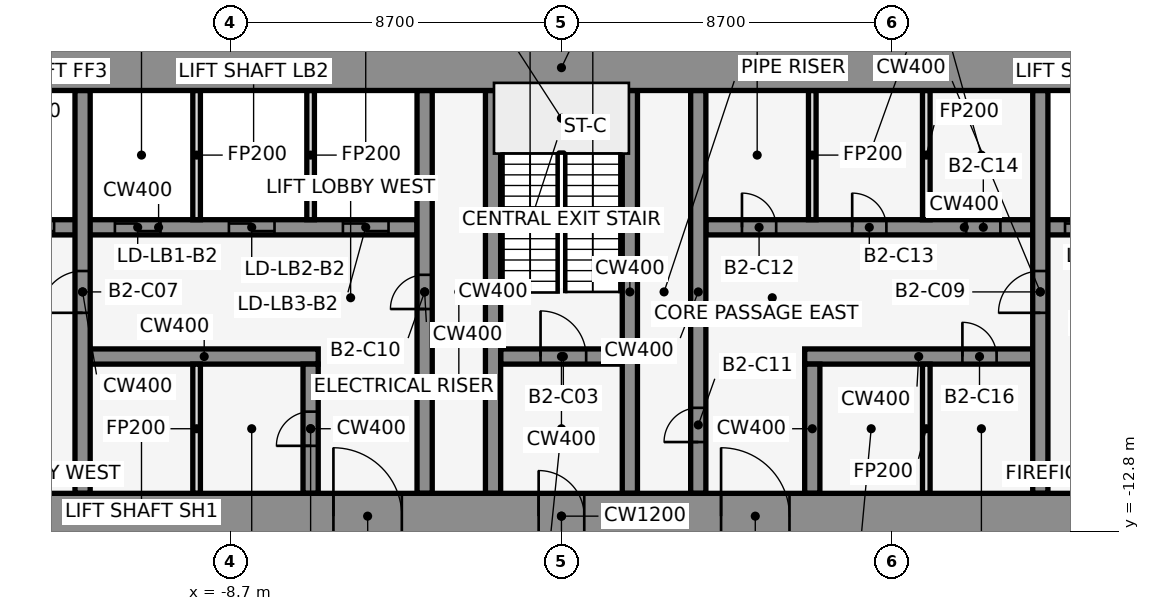
"""IFC4 building model, lengths in metres.
Left out: names, types, materials, properties, quantities, classifications, styles, units other than length and angle.
Written with IfcOpenShell. Run it as: python <this file> out.ifc"""

import sys

from ifc_helpers import new_model, si_unit, direction, frame, frame_2d, origin, place, context, subcontext, project, spatial, rectangle, extrude, element, fill, save


model = new_model("IFC4")
c1 = context("Model", 3, precision=1e-05, world=origin(), true_north=direction((0.0, 1.0)))
c2 = subcontext(c1, "Body", "Model", "MODEL_VIEW")
j1 = project(units=[si_unit("LENGTHUNIT", "METRE"), si_unit("PLANEANGLEUNIT", "RADIAN")], contexts=[c1])
p1 = place(None, origin())
s1 = spatial("IfcSite", under=j1, at=p1, CompositionType="ELEMENT")
p2 = place(p1, origin())
s2 = spatial("IfcBuilding", under=s1, at=p2, CompositionType="ELEMENT")
p3 = place(p2, frame((0.0, 0.0, -10.0)))
s3 = spatial("IfcBuildingStorey", under=s2, at=p3, CompositionType="ELEMENT", Elevation=-10.0)
p4 = place(p3, frame((-12.4, -8.2, 0.0), z_axis=(0.0, 0.0, 1.0), x_axis=(1.0, 0.0, 0.0)))
e1 = element("IfcWall", 1, at=p4, inside=s3, PredefinedType="SHEAR", context=c2, shape_type="SweptSolid", body=[
    extrude(rectangle(XDim=6.0, YDim=0.4, at=frame_2d((3.0, 0.0))), origin(), (0.0, 0.0, 1.0), 5.0),
])
p5 = place(p3, frame((-1.6, -8.2, 0.0), z_axis=(0.0, 0.0, 1.0), x_axis=(1.0, 0.0, 0.0)))
e2 = element("IfcWall", 2, at=p5, inside=s3, PredefinedType="SHEAR", context=c2, shape_type="SweptSolid", body=[
    extrude(rectangle(XDim=3.2, YDim=0.4, at=frame_2d((1.6, 0.0))), origin(), (0.0, 0.0, 1.0), 5.0),
])
p6 = place(p5, frame((1.05, 0.0, 0.0)))
e3 = element("IfcOpeningElement", 3, at=p6, cuts=e2, PredefinedType="OPENING", context=c2, shape_type="SweptSolid", body=[
    extrude(rectangle(XDim=1.2, YDim=2.1, at=frame_2d((0.6, 1.05))), frame((0.0, 0.212, 0.0), z_axis=(0.0, -1.0, 0.0), x_axis=(1.0, 0.0, 0.0)), (0.0, 0.0, 1.0), 0.424),
])
p7 = place(p3, frame((6.4, -8.2, 0.0), z_axis=(0.0, 0.0, 1.0), x_axis=(1.0, 0.0, 0.0)))
e4 = element("IfcWall", 4, at=p7, inside=s3, PredefinedType="SHEAR", context=c2, shape_type="SweptSolid", body=[
    extrude(rectangle(XDim=6.0, YDim=0.4, at=frame_2d((3.0, 0.0))), origin(), (0.0, 0.0, 1.0), 5.0),
])
p8 = place(p7, frame((4.15, 0.0, 0.0)))
e5 = element("IfcOpeningElement", 5, at=p8, cuts=e4, PredefinedType="OPENING", context=c2, shape_type="SweptSolid", body=[
    extrude(rectangle(XDim=0.9, YDim=2.1, at=frame_2d((0.45, 1.05))), frame((0.0, 0.212, 0.0), z_axis=(0.0, -1.0, 0.0), x_axis=(1.0, 0.0, 0.0)), (0.0, 0.0, 1.0), 0.424),
])
p9 = place(p3, frame((-17.4, -4.8, 0.0), z_axis=(0.0, 0.0, 1.0), x_axis=(1.0, 0.0, 0.0)))
e6 = element("IfcWall", 6, at=p9, inside=s3, PredefinedType="SHEAR", context=c2, shape_type="SweptSolid", body=[
    extrude(rectangle(XDim=13.6, YDim=0.4, at=frame_2d((6.8, 0.0))), origin(), (0.0, 0.0, 1.0), 5.0),
])
p10 = place(p9, frame((0.65, 0.0, 0.0)))
e7 = element("IfcOpeningElement", 7, at=p10, cuts=e6, PredefinedType="OPENING", context=c2, shape_type="SweptSolid", body=[
    extrude(rectangle(XDim=1.1, YDim=2.1, at=frame_2d((0.55, 1.05))), frame((0.0, 0.212, 0.0), z_axis=(0.0, -1.0, 0.0), x_axis=(1.0, 0.0, 0.0)), (0.0, 0.0, 1.0), 0.424),
])
p11 = place(p9, frame((2.95, 0.0, 0.0)))
e8 = element("IfcOpeningElement", 8, at=p11, cuts=e6, PredefinedType="OPENING", context=c2, shape_type="SweptSolid", body=[
    extrude(rectangle(XDim=1.1, YDim=2.1, at=frame_2d((0.55, 1.05))), frame((0.0, 0.212, 0.0), z_axis=(0.0, -1.0, 0.0), x_axis=(1.0, 0.0, 0.0)), (0.0, 0.0, 1.0), 0.424),
])
p12 = place(p9, frame((5.65, 0.0, 0.0)))
e9 = element("IfcOpeningElement", 9, at=p12, cuts=e6, PredefinedType="OPENING", context=c2, shape_type="SweptSolid", body=[
    extrude(rectangle(XDim=1.2, YDim=2.1, at=frame_2d((0.6, 1.05))), frame((0.0, 0.212, 0.0), z_axis=(0.0, -1.0, 0.0), x_axis=(1.0, 0.0, 0.0)), (0.0, 0.0, 1.0), 0.424),
])
p13 = place(p9, frame((8.65, 0.0, 0.0)))
e10 = element("IfcOpeningElement", 10, at=p13, cuts=e6, PredefinedType="OPENING", context=c2, shape_type="SweptSolid", body=[
    extrude(rectangle(XDim=1.2, YDim=2.1, at=frame_2d((0.6, 1.05))), frame((0.0, 0.212, 0.0), z_axis=(0.0, -1.0, 0.0), x_axis=(1.0, 0.0, 0.0)), (0.0, 0.0, 1.0), 0.424),
])
p14 = place(p9, frame((11.65, 0.0, 0.0)))
e11 = element("IfcOpeningElement", 11, at=p14, cuts=e6, PredefinedType="OPENING", context=c2, shape_type="SweptSolid", body=[
    extrude(rectangle(XDim=1.2, YDim=2.1, at=frame_2d((0.6, 1.05))), frame((0.0, 0.212, 0.0), z_axis=(0.0, -1.0, 0.0), x_axis=(1.0, 0.0, 0.0)), (0.0, 0.0, 1.0), 0.424),
])
p15 = place(p3, frame((3.8, -4.8, 0.0), z_axis=(0.0, 0.0, 1.0), x_axis=(1.0, 0.0, 0.0)))
e12 = element("IfcWall", 12, at=p15, inside=s3, PredefinedType="SHEAR", context=c2, shape_type="SweptSolid", body=[
    extrude(rectangle(XDim=13.6, YDim=0.4, at=frame_2d((6.8, 0.0))), origin(), (0.0, 0.0, 1.0), 5.0),
])
p16 = place(p15, frame((9.45, 0.0, 0.0)))
e13 = element("IfcOpeningElement", 13, at=p16, cuts=e12, PredefinedType="OPENING", context=c2, shape_type="SweptSolid", body=[
    extrude(rectangle(XDim=1.1, YDim=2.1, at=frame_2d((0.55, 1.05))), frame((0.0, 0.212, 0.0), z_axis=(0.0, -1.0, 0.0), x_axis=(1.0, 0.0, 0.0)), (0.0, 0.0, 1.0), 0.424),
])
p17 = place(p15, frame((11.85, 0.0, 0.0)))
e14 = element("IfcOpeningElement", 14, at=p17, cuts=e12, PredefinedType="OPENING", context=c2, shape_type="SweptSolid", body=[
    extrude(rectangle(XDim=1.1, YDim=2.1, at=frame_2d((0.55, 1.05))), frame((0.0, 0.212, 0.0), z_axis=(0.0, -1.0, 0.0), x_axis=(1.0, 0.0, 0.0)), (0.0, 0.0, 1.0), 0.424),
])
p18 = place(p15, frame((0.95, 0.0, 0.0)))
e15 = element("IfcOpeningElement", 15, at=p18, cuts=e12, PredefinedType="OPENING", context=c2, shape_type="SweptSolid", body=[
    extrude(rectangle(XDim=0.9, YDim=2.1, at=frame_2d((0.45, 1.05))), frame((0.0, 0.212, 0.0), z_axis=(0.0, -1.0, 0.0), x_axis=(1.0, 0.0, 0.0)), (0.0, 0.0, 1.0), 0.424),
])
p19 = place(p15, frame((3.85, 0.0, 0.0)))
e16 = element("IfcOpeningElement", 16, at=p19, cuts=e12, PredefinedType="OPENING", context=c2, shape_type="SweptSolid", body=[
    extrude(rectangle(XDim=0.9, YDim=2.1, at=frame_2d((0.45, 1.05))), frame((0.0, 0.212, 0.0), z_axis=(0.0, -1.0, 0.0), x_axis=(1.0, 0.0, 0.0)), (0.0, 0.0, 1.0), 0.424),
])
p20 = place(p15, frame((6.85, 0.0, 0.0)))
e17 = element("IfcOpeningElement", 17, at=p20, cuts=e12, PredefinedType="OPENING", context=c2, shape_type="SweptSolid", body=[
    extrude(rectangle(XDim=0.9, YDim=2.1, at=frame_2d((0.45, 1.05))), frame((0.0, 0.212, 0.0), z_axis=(0.0, -1.0, 0.0), x_axis=(1.0, 0.0, 0.0)), (0.0, 0.0, 1.0), 0.424),
])
p21 = place(p3, frame((-12.6, -11.8, 0.0), z_axis=(0.0, 0.0, 1.0), x_axis=(0.0, 1.0, 0.0)))
e18 = element("IfcWall", 18, at=p21, inside=s3, PredefinedType="SHEAR", context=c2, shape_type="SweptSolid", body=[
    extrude(rectangle(XDim=10.6, YDim=0.4, at=frame_2d((5.3, 0.0))), origin(), (0.0, 0.0, 1.0), 5.0),
])
p22 = place(p21, frame((4.75, 0.0, 0.0)))
e19 = element("IfcOpeningElement", 19, at=p22, cuts=e18, PredefinedType="OPENING", context=c2, shape_type="SweptSolid", body=[
    extrude(rectangle(XDim=1.1, YDim=2.1, at=frame_2d((0.55, 1.05))), frame((0.0, 0.212, 0.0), z_axis=(0.0, -1.0, 0.0), x_axis=(1.0, 0.0, 0.0)), (0.0, 0.0, 1.0), 0.424),
])
for number, where, z_axis, x_axis in (
    (20, (-9.6, -11.8, 0.0), (0.0, 0.0, 1.0), (0.0, 1.0, 0.0)),
    (21, (-9.6, -4.6, 0.0), (0.0, 0.0, 1.0), (0.0, 1.0, 0.0)),
):
    element("IfcWall", number, at=place(p3, frame(where, z_axis=z_axis, x_axis=x_axis)), inside=s3, PredefinedType="PARTITIONING", context=c2, shape_type="SweptSolid", body=[
        extrude(rectangle(XDim=3.4, YDim=0.2, at=frame_2d((1.7, 0.0))), origin(), (0.0, 0.0, 1.0), 4.7),
    ])
p23 = place(p3, frame((-6.6, -11.8, 0.0), z_axis=(0.0, 0.0, 1.0), x_axis=(0.0, 1.0, 0.0)))
e22 = element("IfcWall", 22, at=p23, inside=s3, PredefinedType="SHEAR", context=c2, shape_type="SweptSolid", body=[
    extrude(rectangle(XDim=3.4, YDim=0.4, at=frame_2d((1.7, 0.0))), origin(), (0.0, 0.0, 1.0), 5.0),
])
p24 = place(p23, frame((1.25, 0.0, 0.0)))
e23 = element("IfcOpeningElement", 23, at=p24, cuts=e22, PredefinedType="OPENING", context=c2, shape_type="SweptSolid", body=[
    extrude(rectangle(XDim=0.9, YDim=2.1, at=frame_2d((0.45, 1.05))), frame((0.0, 0.212, 0.0), z_axis=(0.0, -1.0, 0.0), x_axis=(1.0, 0.0, 0.0)), (0.0, 0.0, 1.0), 0.424),
])
p25 = place(p3, frame((-6.6, -4.6, 0.0), z_axis=(0.0, 0.0, 1.0), x_axis=(0.0, 1.0, 0.0)))
e24 = element("IfcWall", 24, at=p25, inside=s3, PredefinedType="PARTITIONING", context=c2, shape_type="SweptSolid", body=[
    extrude(rectangle(XDim=3.4, YDim=0.2, at=frame_2d((1.7, 0.0))), origin(), (0.0, 0.0, 1.0), 4.7),
])
p26 = place(p3, frame((-3.6, -11.8, 0.0), z_axis=(0.0, 0.0, 1.0), x_axis=(0.0, 1.0, 0.0)))
e25 = element("IfcWall", 25, at=p26, inside=s3, PredefinedType="SHEAR", context=c2, shape_type="SweptSolid", body=[
    extrude(rectangle(XDim=10.6, YDim=0.4, at=frame_2d((5.3, 0.0))), origin(), (0.0, 0.0, 1.0), 5.0),
])
p27 = place(p26, frame((4.85, 0.0, 0.0)))
e26 = element("IfcOpeningElement", 26, at=p27, cuts=e25, PredefinedType="OPENING", context=c2, shape_type="SweptSolid", body=[
    extrude(rectangle(XDim=0.9, YDim=2.1, at=frame_2d((0.45, 1.05))), frame((0.0, 0.212, 0.0), z_axis=(0.0, -1.0, 0.0), x_axis=(1.0, 0.0, 0.0)), (0.0, 0.0, 1.0), 0.424),
])
for number, where, z_axis, x_axis in (
    (27, (-1.8, -11.8, 0.0), (0.0, 0.0, 1.0), (0.0, 1.0, 0.0)),
    (28, (1.8, -11.8, 0.0), (0.0, 0.0, 1.0), (0.0, 1.0, 0.0)),
):
    element("IfcWall", number, at=place(p3, frame(where, z_axis=z_axis, x_axis=x_axis)), inside=s3, PredefinedType="SHEAR", context=c2, shape_type="SweptSolid", body=[
        extrude(rectangle(XDim=10.6, YDim=0.4, at=frame_2d((5.3, 0.0))), origin(), (0.0, 0.0, 1.0), 5.0),
    ])
p28 = place(p3, frame((3.6, -11.8, 0.0), z_axis=(0.0, 0.0, 1.0), x_axis=(0.0, 1.0, 0.0)))
e29 = element("IfcWall", 29, at=p28, inside=s3, PredefinedType="SHEAR", context=c2, shape_type="SweptSolid", body=[
    extrude(rectangle(XDim=10.6, YDim=0.4, at=frame_2d((5.3, 0.0))), origin(), (0.0, 0.0, 1.0), 5.0),
])
p29 = place(p28, frame((1.35, 0.0, 0.0)))
e30 = element("IfcOpeningElement", 30, at=p29, cuts=e29, PredefinedType="OPENING", context=c2, shape_type="SweptSolid", body=[
    extrude(rectangle(XDim=0.9, YDim=2.1, at=frame_2d((0.45, 1.05))), frame((0.0, 0.212, 0.0), z_axis=(0.0, -1.0, 0.0), x_axis=(1.0, 0.0, 0.0)), (0.0, 0.0, 1.0), 0.424),
])
p30 = place(p3, frame((6.6, -11.8, 0.0), z_axis=(0.0, 0.0, 1.0), x_axis=(0.0, 1.0, 0.0)))
e31 = element("IfcWall", 31, at=p30, inside=s3, PredefinedType="SHEAR", context=c2, shape_type="SweptSolid", body=[
    extrude(rectangle(XDim=3.4, YDim=0.4, at=frame_2d((1.7, 0.0))), origin(), (0.0, 0.0, 1.0), 5.0),
])
for number, where, z_axis, x_axis in (
    (32, (6.6, -4.6, 0.0), (0.0, 0.0, 1.0), (0.0, 1.0, 0.0)),
    (33, (9.6, -11.8, 0.0), (0.0, 0.0, 1.0), (0.0, 1.0, 0.0)),
    (34, (9.6, -4.6, 0.0), (0.0, 0.0, 1.0), (0.0, 1.0, 0.0)),
):
    element("IfcWall", number, at=place(p3, frame(where, z_axis=z_axis, x_axis=x_axis)), inside=s3, PredefinedType="PARTITIONING", context=c2, shape_type="SweptSolid", body=[
        extrude(rectangle(XDim=3.4, YDim=0.2, at=frame_2d((1.7, 0.0))), origin(), (0.0, 0.0, 1.0), 4.7),
    ])
p31 = place(p3, frame((12.6, -11.8, 0.0), z_axis=(0.0, 0.0, 1.0), x_axis=(0.0, 1.0, 0.0)))
e35 = element("IfcWall", 35, at=p31, inside=s3, PredefinedType="SHEAR", context=c2, shape_type="SweptSolid", body=[
    extrude(rectangle(XDim=10.6, YDim=0.4, at=frame_2d((5.3, 0.0))), origin(), (0.0, 0.0, 1.0), 5.0),
])
p32 = place(p31, frame((4.75, 0.0, 0.0)))
e36 = element("IfcOpeningElement", 36, at=p32, cuts=e35, PredefinedType="OPENING", context=c2, shape_type="SweptSolid", body=[
    extrude(rectangle(XDim=1.1, YDim=2.1, at=frame_2d((0.55, 1.05))), frame((0.0, 0.212, 0.0), z_axis=(0.0, -1.0, 0.0), x_axis=(1.0, 0.0, 0.0)), (0.0, 0.0, 1.0), 0.424),
])
p33 = place(p3, frame((-22.0, -0.6, 0.0), z_axis=(0.0, 0.0, 1.0), x_axis=(1.0, 0.0, 0.0)))
e37 = element("IfcWall", 37, at=p33, inside=s3, PredefinedType="SHEAR", context=c2, shape_type="SweptSolid", body=[
    extrude(rectangle(XDim=44.0, YDim=1.2, at=frame_2d((22.0, 0.0))), origin(), (0.0, 0.0, 1.0), 5.0),
])
p34 = place(p3, frame((-22.0, -12.4, 0.0), z_axis=(0.0, 0.0, 1.0), x_axis=(1.0, 0.0, 0.0)))
e38 = element("IfcWall", 38, at=p34, inside=s3, PredefinedType="SHEAR", context=c2, shape_type="SweptSolid", body=[
    extrude(rectangle(XDim=44.0, YDim=1.2, at=frame_2d((22.0, 0.0))), origin(), (0.0, 0.0, 1.0), 5.0),
])
p35 = place(p34, frame((2.2, 0.0, 0.0)))
e39 = element("IfcOpeningElement", 39, at=p35, cuts=e38, PredefinedType="OPENING", context=c2, shape_type="SweptSolid", body=[
    extrude(rectangle(XDim=1.2, YDim=2.1, at=frame_2d((0.6, 1.05))), frame((0.0, 0.612, 0.0), z_axis=(0.0, -1.0, 0.0), x_axis=(1.0, 0.0, 0.0)), (0.0, 0.0, 1.0), 1.224),
])
p36 = place(p34, frame((21.4, 0.0, 0.0)))
e40 = element("IfcOpeningElement", 40, at=p36, cuts=e38, PredefinedType="OPENING", context=c2, shape_type="SweptSolid", body=[
    extrude(rectangle(XDim=1.2, YDim=2.1, at=frame_2d((0.6, 1.05))), frame((0.0, 0.612, 0.0), z_axis=(0.0, -1.0, 0.0), x_axis=(1.0, 0.0, 0.0)), (0.0, 0.0, 1.0), 1.224),
])
p37 = place(p34, frame((40.6, 0.0, 0.0)))
e41 = element("IfcOpeningElement", 41, at=p37, cuts=e38, PredefinedType="OPENING", context=c2, shape_type="SweptSolid", body=[
    extrude(rectangle(XDim=1.2, YDim=2.1, at=frame_2d((0.6, 1.05))), frame((0.0, 0.612, 0.0), z_axis=(0.0, -1.0, 0.0), x_axis=(1.0, 0.0, 0.0)), (0.0, 0.0, 1.0), 1.224),
])
p38 = place(p34, frame((16.0, 0.0, 0.0)))
e42 = element("IfcOpeningElement", 42, at=p38, cuts=e38, PredefinedType="OPENING", context=c2, shape_type="SweptSolid", body=[
    extrude(rectangle(XDim=1.8, YDim=2.1, at=frame_2d((0.9, 1.05))), frame((0.0, 0.612, 0.0), z_axis=(0.0, -1.0, 0.0), x_axis=(1.0, 0.0, 0.0)), (0.0, 0.0, 1.0), 1.224),
])
p39 = place(p34, frame((6.3, 0.0, 0.0)))
e43 = element("IfcOpeningElement", 43, at=p39, cuts=e38, PredefinedType="OPENING", context=c2, shape_type="SweptSolid", body=[
    extrude(rectangle(XDim=1.2, YDim=2.1, at=frame_2d((0.6, 1.05))), frame((0.0, 0.612, 0.0), z_axis=(0.0, -1.0, 0.0), x_axis=(1.0, 0.0, 0.0)), (0.0, 0.0, 1.0), 1.224),
])
p40 = place(p34, frame((26.2, 0.0, 0.0)))
e44 = element("IfcOpeningElement", 44, at=p40, cuts=e38, PredefinedType="OPENING", context=c2, shape_type="SweptSolid", body=[
    extrude(rectangle(XDim=1.8, YDim=2.1, at=frame_2d((0.9, 1.05))), frame((0.0, 0.612, 0.0), z_axis=(0.0, -1.0, 0.0), x_axis=(1.0, 0.0, 0.0)), (0.0, 0.0, 1.0), 1.224),
])
p41 = place(p34, frame((36.5, 0.0, 0.0)))
e45 = element("IfcOpeningElement", 45, at=p41, cuts=e38, PredefinedType="OPENING", context=c2, shape_type="SweptSolid", body=[
    extrude(rectangle(XDim=1.2, YDim=2.1, at=frame_2d((0.6, 1.05))), frame((0.0, 0.612, 0.0), z_axis=(0.0, -1.0, 0.0), x_axis=(1.0, 0.0, 0.0)), (0.0, 0.0, 1.0), 1.224),
])
p42 = place(p6, origin())
e46 = element("IfcDoor", 46, at=p42, inside=s3, OperationType="SINGLE_SWING_LEFT", PredefinedType="DOOR", context=c2, shape_type="SweptSolid", body=[
    extrude(rectangle(XDim=1.2, YDim=2.1, at=frame_2d((0.6, 1.05))), frame((0.0, 0.025, 0.0), z_axis=(0.0, -1.0, 0.0), x_axis=(1.0, 0.0, 0.0)), (0.0, 0.0, 1.0), 0.05),
])
fill(e3, e46)
p43 = place(p11, origin())
e47 = element("IfcDoor", 47, at=p43, inside=s3, OperationType="DOUBLE_DOOR_SLIDING", PredefinedType="DOOR", context=c2, shape_type="SweptSolid", body=[
    extrude(rectangle(XDim=1.1, YDim=2.1, at=frame_2d((0.55, 1.05))), frame((0.0, 0.025, 0.0), z_axis=(0.0, -1.0, 0.0), x_axis=(1.0, 0.0, 0.0)), (0.0, 0.0, 1.0), 0.05),
])
fill(e8, e47)
p44 = place(p12, origin())
e48 = element("IfcDoor", 48, at=p44, inside=s3, OperationType="DOUBLE_DOOR_SLIDING", PredefinedType="DOOR", context=c2, shape_type="SweptSolid", body=[
    extrude(rectangle(XDim=1.2, YDim=2.1, at=frame_2d((0.6, 1.05))), frame((0.0, 0.025, 0.0), z_axis=(0.0, -1.0, 0.0), x_axis=(1.0, 0.0, 0.0)), (0.0, 0.0, 1.0), 0.05),
])
fill(e9, e48)
p45 = place(p13, origin())
e49 = element("IfcDoor", 49, at=p45, inside=s3, OperationType="DOUBLE_DOOR_SLIDING", PredefinedType="DOOR", context=c2, shape_type="SweptSolid", body=[
    extrude(rectangle(XDim=1.2, YDim=2.1, at=frame_2d((0.6, 1.05))), frame((0.0, 0.025, 0.0), z_axis=(0.0, -1.0, 0.0), x_axis=(1.0, 0.0, 0.0)), (0.0, 0.0, 1.0), 0.05),
])
fill(e10, e49)
p46 = place(p14, origin())
e50 = element("IfcDoor", 50, at=p46, inside=s3, OperationType="DOUBLE_DOOR_SLIDING", PredefinedType="DOOR", context=c2, shape_type="SweptSolid", body=[
    extrude(rectangle(XDim=1.2, YDim=2.1, at=frame_2d((0.6, 1.05))), frame((0.0, 0.025, 0.0), z_axis=(0.0, -1.0, 0.0), x_axis=(1.0, 0.0, 0.0)), (0.0, 0.0, 1.0), 0.05),
])
fill(e11, e50)
p47 = place(p16, origin())
e51 = element("IfcDoor", 51, at=p47, inside=s3, OperationType="DOUBLE_DOOR_SLIDING", PredefinedType="DOOR", context=c2, shape_type="SweptSolid", body=[
    extrude(rectangle(XDim=1.1, YDim=2.1, at=frame_2d((0.55, 1.05))), frame((0.0, 0.025, 0.0), z_axis=(0.0, -1.0, 0.0), x_axis=(1.0, 0.0, 0.0)), (0.0, 0.0, 1.0), 0.05),
])
fill(e13, e51)
p48 = place(p22, origin())
e52 = element("IfcDoor", 52, at=p48, inside=s3, OperationType="SINGLE_SWING_LEFT", PredefinedType="DOOR", context=c2, shape_type="SweptSolid", body=[
    extrude(rectangle(XDim=1.1, YDim=2.1, at=frame_2d((0.55, 1.05))), frame((0.0, 0.025, 0.0), z_axis=(0.0, -1.0, 0.0), x_axis=(1.0, 0.0, 0.0)), (0.0, 0.0, 1.0), 0.05),
])
fill(e19, e52)
p49 = place(p32, frame((1.1, 0.0, 0.0), z_axis=(0.0, 0.0, 1.0), x_axis=(-1.0, 0.0, 0.0)))
e53 = element("IfcDoor", 53, at=p49, inside=s3, OperationType="SINGLE_SWING_RIGHT", PredefinedType="DOOR", context=c2, shape_type="SweptSolid", body=[
    extrude(rectangle(XDim=1.1, YDim=2.1, at=frame_2d((0.55, 1.05))), frame((0.0, 0.025, 0.0), z_axis=(0.0, -1.0, 0.0), x_axis=(1.0, 0.0, 0.0)), (0.0, 0.0, 1.0), 0.05),
])
fill(e36, e53)
p50 = place(p27, frame((0.9, 0.0, 0.0), z_axis=(0.0, 0.0, 1.0), x_axis=(-1.0, 0.0, 0.0)))
e54 = element("IfcDoor", 54, at=p50, inside=s3, OperationType="SINGLE_SWING_LEFT", PredefinedType="DOOR", context=c2, shape_type="SweptSolid", body=[
    extrude(rectangle(XDim=0.9, YDim=2.1, at=frame_2d((0.45, 1.05))), frame((0.0, 0.025, 0.0), z_axis=(0.0, -1.0, 0.0), x_axis=(1.0, 0.0, 0.0)), (0.0, 0.0, 1.0), 0.05),
])
fill(e26, e54)
p51 = place(p29, origin())
e55 = element("IfcDoor", 55, at=p51, inside=s3, OperationType="SINGLE_SWING_LEFT", PredefinedType="DOOR", context=c2, shape_type="SweptSolid", body=[
    extrude(rectangle(XDim=0.9, YDim=2.1, at=frame_2d((0.45, 1.05))), frame((0.0, 0.025, 0.0), z_axis=(0.0, -1.0, 0.0), x_axis=(1.0, 0.0, 0.0)), (0.0, 0.0, 1.0), 0.05),
])
fill(e30, e55)
p52 = place(p18, origin())
e56 = element("IfcDoor", 56, at=p52, inside=s3, OperationType="SINGLE_SWING_RIGHT", PredefinedType="DOOR", context=c2, shape_type="SweptSolid", body=[
    extrude(rectangle(XDim=0.9, YDim=2.1, at=frame_2d((0.45, 1.05))), frame((0.0, 0.025, 0.0), z_axis=(0.0, -1.0, 0.0), x_axis=(1.0, 0.0, 0.0)), (0.0, 0.0, 1.0), 0.05),
])
fill(e15, e56)
p53 = place(p19, origin())
e57 = element("IfcDoor", 57, at=p53, inside=s3, OperationType="SINGLE_SWING_LEFT", PredefinedType="DOOR", context=c2, shape_type="SweptSolid", body=[
    extrude(rectangle(XDim=0.9, YDim=2.1, at=frame_2d((0.45, 1.05))), frame((0.0, 0.025, 0.0), z_axis=(0.0, -1.0, 0.0), x_axis=(1.0, 0.0, 0.0)), (0.0, 0.0, 1.0), 0.05),
])
fill(e16, e57)
p54 = place(p20, origin())
e58 = element("IfcDoor", 58, at=p54, inside=s3, OperationType="SINGLE_SWING_RIGHT", PredefinedType="DOOR", context=c2, shape_type="SweptSolid", body=[
    extrude(rectangle(XDim=0.9, YDim=2.1, at=frame_2d((0.45, 1.05))), frame((0.0, 0.025, 0.0), z_axis=(0.0, -1.0, 0.0), x_axis=(1.0, 0.0, 0.0)), (0.0, 0.0, 1.0), 0.05),
])
fill(e17, e58)
p55 = place(p24, origin())
e59 = element("IfcDoor", 59, at=p55, inside=s3, OperationType="SINGLE_SWING_LEFT", PredefinedType="DOOR", context=c2, shape_type="SweptSolid", body=[
    extrude(rectangle(XDim=0.9, YDim=2.1, at=frame_2d((0.45, 1.05))), frame((0.0, 0.025, 0.0), z_axis=(0.0, -1.0, 0.0), x_axis=(1.0, 0.0, 0.0)), (0.0, 0.0, 1.0), 0.05),
])
fill(e23, e59)
p56 = place(p8, frame((0.9, 0.0, 0.0), z_axis=(0.0, 0.0, 1.0), x_axis=(-1.0, 0.0, 0.0)))
e60 = element("IfcDoor", 60, at=p56, inside=s3, OperationType="SINGLE_SWING_LEFT", PredefinedType="DOOR", context=c2, shape_type="SweptSolid", body=[
    extrude(rectangle(XDim=0.9, YDim=2.1, at=frame_2d((0.45, 1.05))), frame((0.0, 0.025, 0.0), z_axis=(0.0, -1.0, 0.0), x_axis=(1.0, 0.0, 0.0)), (0.0, 0.0, 1.0), 0.05),
])
fill(e5, e60)
p57 = place(p36, frame((1.2, 0.0, 0.0), z_axis=(0.0, 0.0, 1.0), x_axis=(-1.0, 0.0, 0.0)))
e61 = element("IfcDoor", 61, at=p57, inside=s3, OperationType="SINGLE_SWING_RIGHT", PredefinedType="DOOR", context=c2, shape_type="SweptSolid", body=[
    extrude(rectangle(XDim=1.2, YDim=2.1, at=frame_2d((0.6, 1.05))), frame((0.0, 0.025, 0.0), z_axis=(0.0, -1.0, 0.0), x_axis=(1.0, 0.0, 0.0)), (0.0, 0.0, 1.0), 0.05),
])
fill(e40, e61)
p58 = place(p38, origin())
e62 = element("IfcDoor", 62, at=p58, inside=s3, OperationType="SINGLE_SWING_LEFT", PredefinedType="DOOR", context=c2, shape_type="SweptSolid", body=[
    extrude(rectangle(XDim=1.8, YDim=2.1, at=frame_2d((0.9, 1.05))), frame((0.0, 0.025, 0.0), z_axis=(0.0, -1.0, 0.0), x_axis=(1.0, 0.0, 0.0)), (0.0, 0.0, 1.0), 0.05),
])
fill(e42, e62)
p59 = place(p40, origin())
e63 = element("IfcDoor", 63, at=p59, inside=s3, OperationType="SINGLE_SWING_LEFT", PredefinedType="DOOR", context=c2, shape_type="SweptSolid", body=[
    extrude(rectangle(XDim=1.8, YDim=2.1, at=frame_2d((0.9, 1.05))), frame((0.0, 0.025, 0.0), z_axis=(0.0, -1.0, 0.0), x_axis=(1.0, 0.0, 0.0)), (0.0, 0.0, 1.0), 0.05),
])
fill(e44, e63)
save(model, sys.argv[1])
